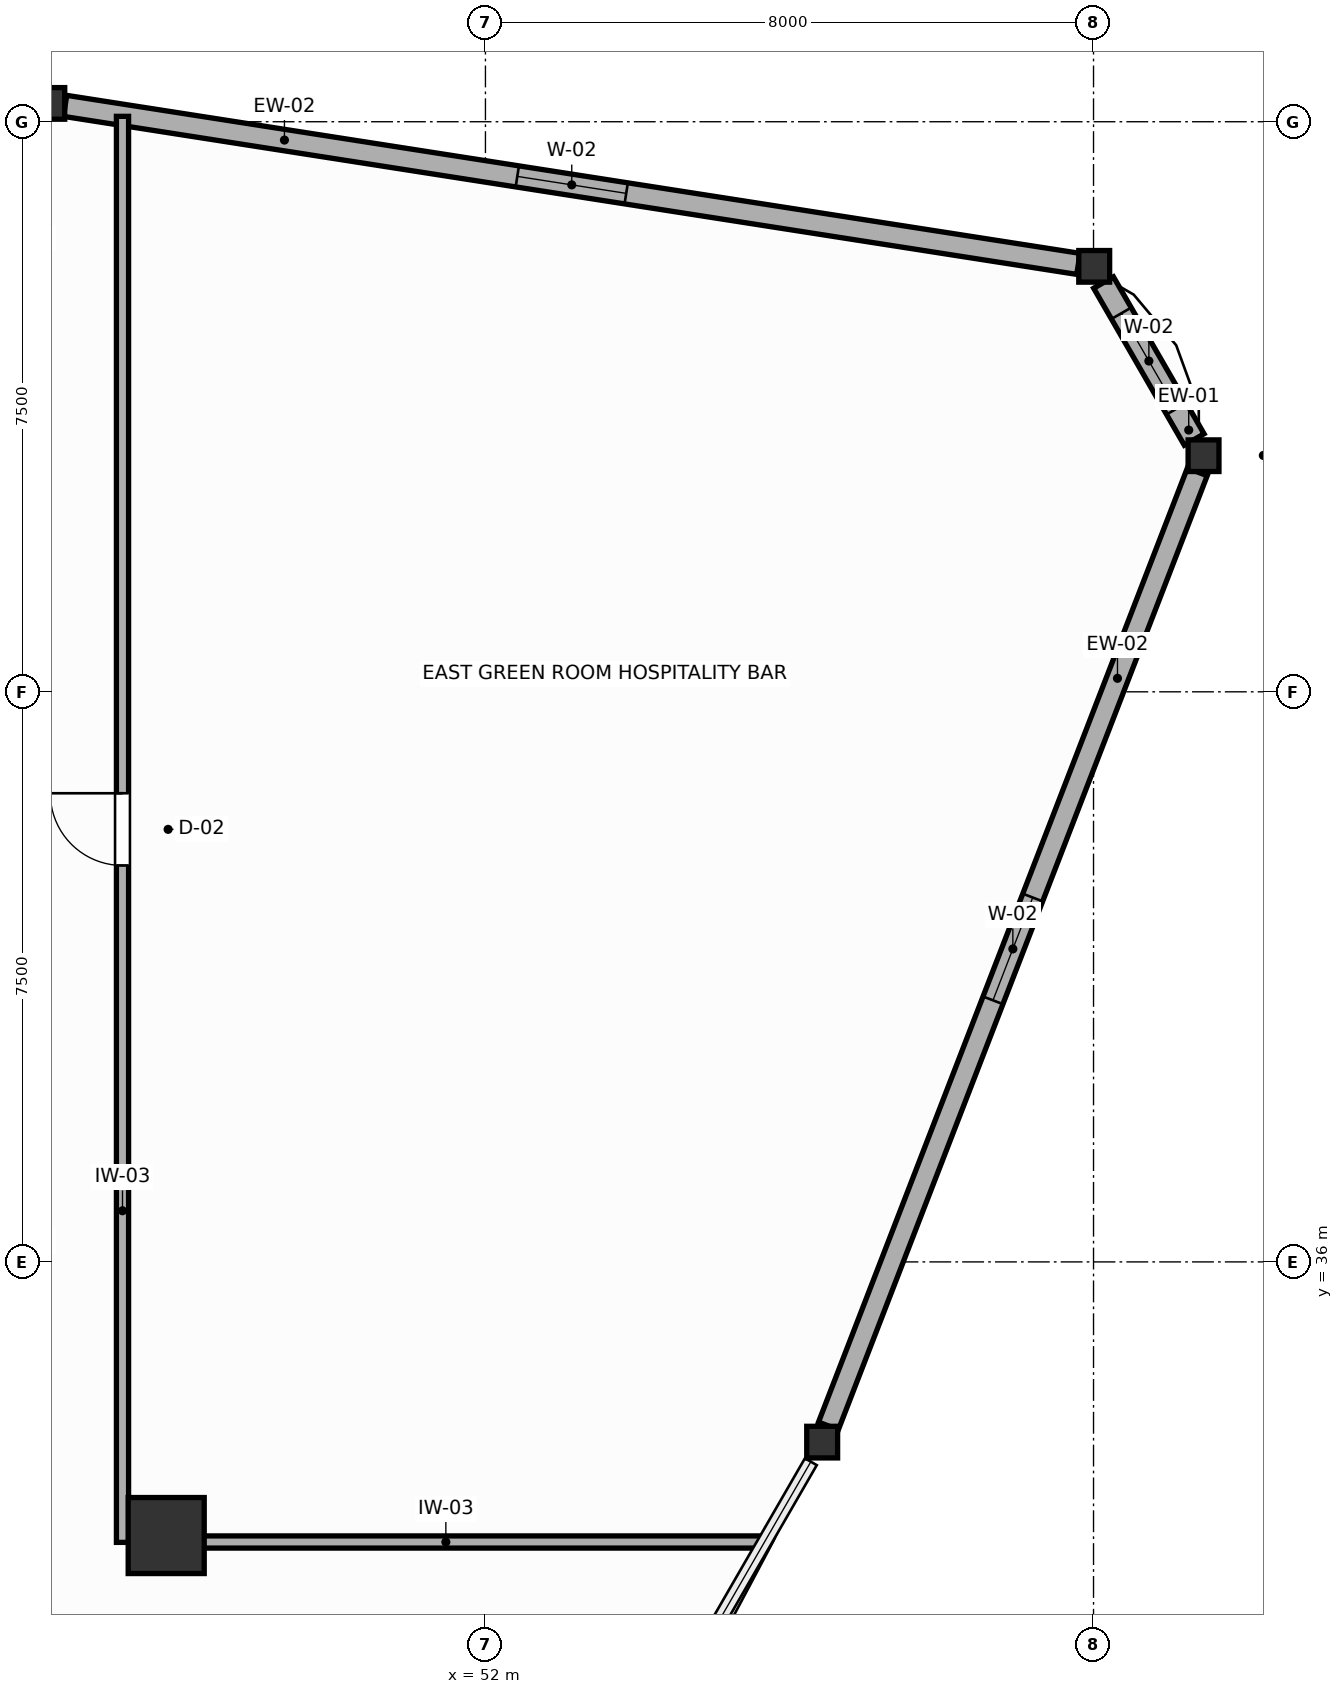
"""IFC4 building model, lengths in metres.
Left out: names, types, materials, properties, quantities, classifications, styles, units other than length and angle.
Written with IfcOpenShell. Run it as: python <this file> out.ifc"""

import sys

from ifc_helpers import new_model, si_unit, direction, frame, frame_2d, origin, origin_2d, place, context, subcontext, project, spatial, rectangle, i_section, extrude, source, transform, mapped, element, fill, save


model = new_model("IFC4")
c1 = context("Model", 3, precision=1e-05, world=origin(), true_north=direction((0.0, 1.0)))
c2 = subcontext(c1, "Body", "Model", "MODEL_VIEW")
j1 = project(units=[si_unit("LENGTHUNIT", "METRE"), si_unit("PLANEANGLEUNIT", "RADIAN")], contexts=[c1])
p1 = place(None, origin())
s1 = spatial("IfcSite", under=j1, at=p1, CompositionType="ELEMENT")
p2 = place(p1, origin())
s2 = spatial("IfcBuilding", under=s1, at=p2, CompositionType="ELEMENT")
p3 = place(p2, frame((0.0, 0.0, 234.6)))
s3 = spatial("IfcBuildingStorey", under=s2, at=p3, CompositionType="ELEMENT", Elevation=234.6)
m1 = source(origin(), c2, "Body", "SweptSolid", [
    extrude(rectangle(XDim=1.0, YDim=1.0, at=origin_2d()), origin(), (0.0, 0.0, 1.0), 3.6),
])
p4 = place(p3, frame((47.8, 32.4, 0.0), z_axis=(0.0, 0.0, 1.0), x_axis=(1.0, 0.0, 0.0)))
e1 = element("IfcColumn", 1, at=p4, inside=s3, PredefinedType="COLUMN", context=c2, shape_type="MappedRepresentation", body=[
    mapped(m1, transform((0.0, 0.0, 0.0), scale=1.0)),
])
m2 = source(origin(), c2, "Body", "SweptSolid", [
    extrude(i_section(OverallWidth=0.406, OverallDepth=0.416, WebThickness=0.027, FlangeThickness=0.044, FilletRadius=0.015, at=origin_2d()), origin(), (0.0, 0.0, 1.0), 3.6),
])
for number, where, z_axis, x_axis in (
    (2, (61.447, 46.606, 0.0), (0.0, 0.0, 1.0), (1.0, 0.0, 0.0)),
    (3, (60.009, 49.098, 0.0), (0.0, 0.0, 1.0), (1.0, 0.0, 0.0)),
    (4, (46.262, 51.241, 0.0), (0.0, 0.0, 1.0), (1.0, 0.0, 0.0)),
    (5, (56.43, 33.629, 0.0), (0.0, 0.0, 1.0), (1.0, 0.0, 0.0)),
):
    element("IfcColumn", number, at=place(p3, frame(where, z_axis=z_axis, x_axis=x_axis)), inside=s3, PredefinedType="COLUMN", context=c2, shape_type="MappedRepresentation", body=[
        mapped(m2, transform((0.0, 0.0, 0.0), scale=1.0)),
    ])
p5 = place(p3, frame((61.324, 46.819, 0.0), z_axis=(0.0, 0.0, 1.0), x_axis=(-0.499938113561, 0.866061130988, 0.0)))
e6 = element("IfcWall", 6, at=p5, inside=s3, PredefinedType="SOLIDWALL", context=c2, shape_type="SweptSolid", body=[
    extrude(rectangle(XDim=2.385, YDim=0.3, at=frame_2d((1.192, 0.0))), origin(), (0.0, 0.0, 1.0), 2.87),
])
p6 = place(p5, frame((0.467, 0.0, 0.75)))
e7 = element("IfcOpeningElement", 7, at=p6, cuts=e6, PredefinedType="OPENING", context=c2, shape_type="SweptSolid", body=[
    extrude(rectangle(XDim=1.45, YDim=1.65, at=frame_2d((0.725, 0.825))), frame((0.0, 0.16, 0.0), z_axis=(0.0, -1.0, 0.0), x_axis=(1.0, 0.0, 0.0)), (0.0, 0.0, 1.0), 0.32),
])
p7 = place(p3, frame((59.801, 49.13, 0.0), z_axis=(0.0, 0.0, 1.0), x_axis=(-0.988058992674, 0.154076042901, 0.0)))
e8 = element("IfcWall", 8, at=p7, inside=s3, PredefinedType="SOLIDWALL", context=c2, shape_type="SweptSolid", body=[
    extrude(rectangle(XDim=13.492, YDim=0.28, at=frame_2d((6.746, 0.0))), origin(), (0.0, 0.0, 1.0), 2.87),
])
p8 = place(p7, frame((6.021, 0.0, 0.75)))
e9 = element("IfcOpeningElement", 9, at=p8, cuts=e8, PredefinedType="OPENING", context=c2, shape_type="SweptSolid", body=[
    extrude(rectangle(XDim=1.45, YDim=1.65, at=frame_2d((0.725, 0.825))), frame((0.0, 0.15, 0.0), z_axis=(0.0, -1.0, 0.0), x_axis=(1.0, 0.0, 0.0)), (0.0, 0.0, 1.0), 0.3),
])
p9 = place(p3, frame((56.512, 33.842, 0.0), z_axis=(0.0, 0.0, 1.0), x_axis=(0.360605208927, 0.932718544522, 0.0)))
e10 = element("IfcWall", 10, at=p9, inside=s3, PredefinedType="SOLIDWALL", context=c2, shape_type="SweptSolid", body=[
    extrude(rectangle(XDim=13.457, YDim=0.28, at=frame_2d((6.728, 0.0))), origin(), (0.0, 0.0, 1.0), 2.87),
])
p10 = place(p9, frame((6.003, 0.0, 0.75)))
e11 = element("IfcOpeningElement", 11, at=p10, cuts=e10, PredefinedType="OPENING", context=c2, shape_type="SweptSolid", body=[
    extrude(rectangle(XDim=1.45, YDim=1.65, at=frame_2d((0.725, 0.825))), frame((0.0, 0.15, 0.0), z_axis=(0.0, -1.0, 0.0), x_axis=(1.0, 0.0, 0.0)), (0.0, 0.0, 1.0), 0.3),
])
p11 = place(p3, frame((47.225, 32.31, 0.0), z_axis=(0.0, 0.0, 1.0), x_axis=(0.0, 1.0, 0.0)))
e12 = element("IfcWall", 12, at=p11, inside=s3, PredefinedType="PARTITIONING", context=c2, shape_type="SweptSolid", body=[
    extrude(rectangle(XDim=18.761, YDim=0.16, at=frame_2d((9.38, 0.0))), origin(), (0.0, 0.0, 1.0), 3.26),
])
p12 = place(p11, frame((8.906, 0.0, 0.0)))
e13 = element("IfcOpeningElement", 13, at=p12, cuts=e12, PredefinedType="OPENING", context=c2, shape_type="SweptSolid", body=[
    extrude(rectangle(XDim=0.95, YDim=2.05, at=frame_2d((0.475, 1.025))), frame((0.0, 0.09, 0.0), z_axis=(0.0, -1.0, 0.0), x_axis=(1.0, 0.0, 0.0)), (0.0, 0.0, 1.0), 0.18),
])
p13 = place(p3, frame((47.307, 32.315, 0.0), z_axis=(0.0, 0.0, 1.0), x_axis=(1.0, 0.0, 0.0)))
e14 = element("IfcWall", 14, at=p13, inside=s3, PredefinedType="PARTITIONING", context=c2, shape_type="SweptSolid", body=[
    extrude(rectangle(XDim=8.344, YDim=0.16, at=frame_2d((4.172, 0.0))), origin(), (0.0, 0.0, 1.0), 2.81),
])
p14 = place(p6, origin())
e15 = element("IfcWindow", 15, at=p14, inside=s3, PartitioningType="SINGLE_PANEL", PredefinedType="WINDOW", context=c2, shape_type="SweptSolid", body=[
    extrude(rectangle(XDim=1.45, YDim=1.65, at=frame_2d((0.725, 0.825))), frame((0.0, 0.03, 0.0), z_axis=(0.0, -1.0, 0.0), x_axis=(1.0, 0.0, 0.0)), (0.0, 0.0, 1.0), 0.06),
])
fill(e7, e15)
p15 = place(p8, origin())
e16 = element("IfcWindow", 16, at=p15, inside=s3, PartitioningType="SINGLE_PANEL", PredefinedType="WINDOW", context=c2, shape_type="SweptSolid", body=[
    extrude(rectangle(XDim=1.45, YDim=1.65, at=frame_2d((0.725, 0.825))), frame((0.0, 0.03, 0.0), z_axis=(0.0, -1.0, 0.0), x_axis=(1.0, 0.0, 0.0)), (0.0, 0.0, 1.0), 0.06),
])
fill(e9, e16)
p16 = place(p10, origin())
e17 = element("IfcWindow", 17, at=p16, inside=s3, PartitioningType="SINGLE_PANEL", PredefinedType="WINDOW", context=c2, shape_type="SweptSolid", body=[
    extrude(rectangle(XDim=1.45, YDim=1.65, at=frame_2d((0.725, 0.825))), frame((0.0, 0.03, 0.0), z_axis=(0.0, -1.0, 0.0), x_axis=(1.0, 0.0, 0.0)), (0.0, 0.0, 1.0), 0.06),
])
fill(e11, e17)
p17 = place(p12, origin())
e18 = element("IfcDoor", 18, at=p17, inside=s3, OperationType="SINGLE_SWING_RIGHT", PredefinedType="DOOR", context=c2, shape_type="SweptSolid", body=[
    extrude(rectangle(XDim=0.95, YDim=2.05, at=frame_2d((0.475, 1.025))), frame((0.0, 0.025, 0.0), z_axis=(0.0, -1.0, 0.0), x_axis=(1.0, 0.0, 0.0)), (0.0, 0.0, 1.0), 0.05),
])
fill(e13, e18)
save(model, sys.argv[1])
